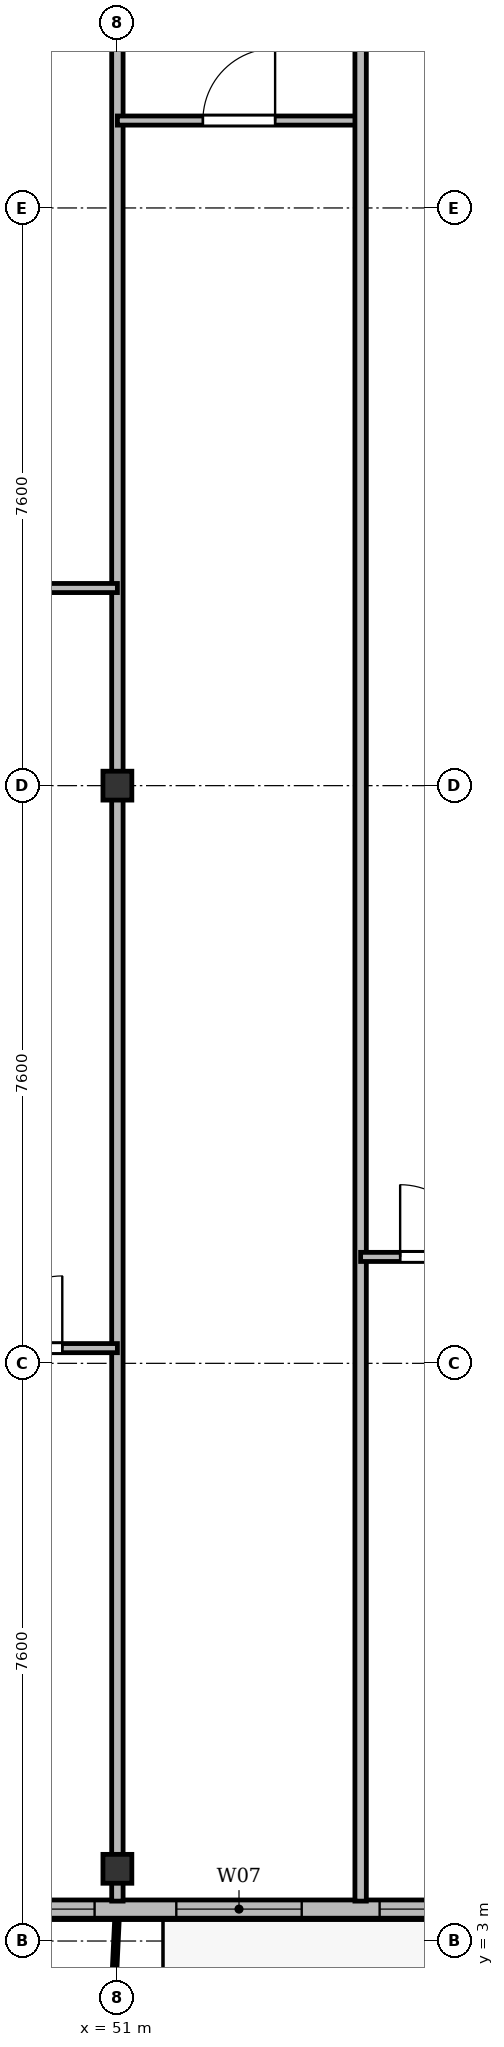
"""IFC4 building model, lengths in metres.
Left out: names, types, materials, properties, quantities, classifications, styles, units other than length and angle.
Written with IfcOpenShell. Run it as: python <this file> out.ifc"""

import sys

from ifc_helpers import new_model, si_unit, direction, frame, frame_2d, origin, origin_2d, place, context, subcontext, project, spatial, rectangle, i_section, extrude, source, transform, mapped, element, fill, save


model = new_model("IFC4")
c1 = context("Model", 3, precision=1e-05, world=origin(), true_north=direction((0.0, 1.0)))
c2 = subcontext(c1, "Body", "Model", "MODEL_VIEW")
j1 = project(units=[si_unit("LENGTHUNIT", "METRE"), si_unit("PLANEANGLEUNIT", "RADIAN")], contexts=[c1])
p1 = place(None, origin())
s1 = spatial("IfcSite", under=j1, at=p1, CompositionType="ELEMENT")
p2 = place(p1, origin())
s2 = spatial("IfcBuilding", under=s1, at=p2, CompositionType="ELEMENT")
p3 = place(p2, frame((0.0, 0.0, 135.7)))
s3 = spatial("IfcBuildingStorey", under=s2, at=p3, CompositionType="ELEMENT", Elevation=135.7)
m1 = source(origin(), c2, "Body", "SweptSolid", [
    extrude(i_section(OverallWidth=0.38, OverallDepth=0.38, WebThickness=0.02, FlangeThickness=0.03, at=origin_2d()), origin(), (0.0, 0.0, 1.0), 3.6),
])
for number, where, z_axis, x_axis in (
    (1, (51.0, 3.95, 0.0), (0.0, 0.0, 1.0), (1.0, 0.0, 0.0)),
    (2, (51.0, 18.2, 0.0), (0.0, 0.0, 1.0), (1.0, 0.0, 0.0)),
):
    element("IfcColumn", number, at=place(p3, frame(where, z_axis=z_axis, x_axis=x_axis)), inside=s3, PredefinedType="COLUMN", context=c2, shape_type="MappedRepresentation", body=[
        mapped(m1, transform((0.0, 0.0, 0.0), x_axis=(1.0, 0.0, 0.0), y_axis=(0.0, 1.0, 0.0), z_axis=(0.0, 0.0, 1.0), scale=1.0)),
    ])
p4 = place(p3, frame((63.6, 3.42, 0.0), z_axis=(0.0, 0.0, 1.0), x_axis=(-1.0, 0.0, 0.0)))
e3 = element("IfcWall", 3, at=p4, inside=s3, PredefinedType="SOLIDWALL", context=c2, shape_type="SweptSolid", body=[
    extrude(rectangle(XDim=52.8, YDim=0.24, at=frame_2d((26.4, 0.0))), origin(), (0.0, 0.0, 1.0), 3.35),
])
p5 = place(p4, frame((0.345, 0.0, 0.9)))
e4 = element("IfcOpeningElement", 4, at=p5, cuts=e3, PredefinedType="OPENING", context=c2, shape_type="SweptSolid", body=[
    extrude(rectangle(XDim=1.8, YDim=1.8, at=frame_2d((0.9, 0.9))), frame((0.0, 0.13, 0.0), z_axis=(0.0, -1.0, 0.0), x_axis=(1.0, 0.0, 0.0)), (0.0, 0.0, 1.0), 0.26),
])
p6 = place(p4, frame((2.9, 0.0, 0.9)))
e5 = element("IfcOpeningElement", 5, at=p6, cuts=e3, PredefinedType="OPENING", context=c2, shape_type="SweptSolid", body=[
    extrude(rectangle(XDim=1.5, YDim=1.75, at=frame_2d((0.75, 0.875))), frame((0.0, 0.13, 0.0), z_axis=(0.0, -1.0, 0.0), x_axis=(1.0, 0.0, 0.0)), (0.0, 0.0, 1.0), 0.26),
])
p7 = place(p4, frame((5.902, 0.0, 0.0)))
e6 = element("IfcOpeningElement", 6, at=p7, cuts=e3, PredefinedType="OPENING", context=c2, shape_type="SweptSolid", body=[
    extrude(rectangle(XDim=1.2, YDim=2.2, at=frame_2d((0.6, 1.1))), frame((0.0, 0.13, 0.0), z_axis=(0.0, -1.0, 0.0), x_axis=(1.0, 0.0, 0.0)), (0.0, 0.0, 1.0), 0.26),
])
p8 = place(p4, frame((7.65, 0.0, 0.9)))
e7 = element("IfcOpeningElement", 7, at=p8, cuts=e3, PredefinedType="OPENING", context=c2, shape_type="SweptSolid", body=[
    extrude(rectangle(XDim=1.5, YDim=1.75, at=frame_2d((0.75, 0.875))), frame((0.0, 0.13, 0.0), z_axis=(0.0, -1.0, 0.0), x_axis=(1.0, 0.0, 0.0)), (0.0, 0.0, 1.0), 0.26),
])
p9 = place(p4, frame((10.175, 0.0, 0.9)))
e8 = element("IfcOpeningElement", 8, at=p9, cuts=e3, PredefinedType="OPENING", context=c2, shape_type="SweptSolid", body=[
    extrude(rectangle(XDim=1.65, YDim=1.85, at=frame_2d((0.825, 0.925))), frame((0.0, 0.13, 0.0), z_axis=(0.0, -1.0, 0.0), x_axis=(1.0, 0.0, 0.0)), (0.0, 0.0, 1.0), 0.26),
])
p10 = place(p4, frame((12.9, 0.0, 0.9)))
e9 = element("IfcOpeningElement", 9, at=p10, cuts=e3, PredefinedType="OPENING", context=c2, shape_type="SweptSolid", body=[
    extrude(rectangle(XDim=1.8, YDim=1.8, at=frame_2d((0.9, 0.9))), frame((0.0, 0.13, 0.0), z_axis=(0.0, -1.0, 0.0), x_axis=(1.0, 0.0, 0.0)), (0.0, 0.0, 1.0), 0.26),
])
p11 = place(p4, frame((15.45, 0.0, 0.9)))
e10 = element("IfcOpeningElement", 10, at=p11, cuts=e3, PredefinedType="OPENING", context=c2, shape_type="SweptSolid", body=[
    extrude(rectangle(XDim=1.5, YDim=1.75, at=frame_2d((0.75, 0.875))), frame((0.0, 0.13, 0.0), z_axis=(0.0, -1.0, 0.0), x_axis=(1.0, 0.0, 0.0)), (0.0, 0.0, 1.0), 0.26),
])
p12 = place(p4, frame((17.85, 0.0, 0.9)))
e11 = element("IfcOpeningElement", 11, at=p12, cuts=e3, PredefinedType="OPENING", context=c2, shape_type="SweptSolid", body=[
    extrude(rectangle(XDim=1.5, YDim=1.75, at=frame_2d((0.75, 0.875))), frame((0.0, 0.13, 0.0), z_axis=(0.0, -1.0, 0.0), x_axis=(1.0, 0.0, 0.0)), (0.0, 0.0, 1.0), 0.26),
])
p13 = place(p4, frame((20.45, 0.0, 0.9)))
e12 = element("IfcOpeningElement", 12, at=p13, cuts=e3, PredefinedType="OPENING", context=c2, shape_type="SweptSolid", body=[
    extrude(rectangle(XDim=2.0, YDim=1.95, at=frame_2d((1.0, 0.975))), frame((0.0, 0.13, 0.0), z_axis=(0.0, -1.0, 0.0), x_axis=(1.0, 0.0, 0.0)), (0.0, 0.0, 1.0), 0.26),
])
p14 = place(p4, frame((23.925, 0.0, 0.9)))
e13 = element("IfcOpeningElement", 13, at=p14, cuts=e3, PredefinedType="OPENING", context=c2, shape_type="SweptSolid", body=[
    extrude(rectangle(XDim=1.65, YDim=1.85, at=frame_2d((0.825, 0.925))), frame((0.0, 0.13, 0.0), z_axis=(0.0, -1.0, 0.0), x_axis=(1.0, 0.0, 0.0)), (0.0, 0.0, 1.0), 0.26),
])
p15 = place(p4, frame((28.8, 0.0, 0.9)))
e14 = element("IfcOpeningElement", 14, at=p15, cuts=e3, PredefinedType="OPENING", context=c2, shape_type="SweptSolid", body=[
    extrude(rectangle(XDim=1.8, YDim=1.8, at=frame_2d((0.9, 0.9))), frame((0.0, 0.13, 0.0), z_axis=(0.0, -1.0, 0.0), x_axis=(1.0, 0.0, 0.0)), (0.0, 0.0, 1.0), 0.26),
])
p16 = place(p4, frame((34.478, 0.0, 0.0)))
e15 = element("IfcOpeningElement", 15, at=p16, cuts=e3, PredefinedType="OPENING", context=c2, shape_type="SweptSolid", body=[
    extrude(rectangle(XDim=1.2, YDim=2.2, at=frame_2d((0.6, 1.1))), frame((0.0, 0.13, 0.0), z_axis=(0.0, -1.0, 0.0), x_axis=(1.0, 0.0, 0.0)), (0.0, 0.0, 1.0), 0.26),
])
p17 = place(p4, frame((37.65, 0.0, 0.9)))
e16 = element("IfcOpeningElement", 16, at=p17, cuts=e3, PredefinedType="OPENING", context=c2, shape_type="SweptSolid", body=[
    extrude(rectangle(XDim=1.5, YDim=1.75, at=frame_2d((0.75, 0.875))), frame((0.0, 0.13, 0.0), z_axis=(0.0, -1.0, 0.0), x_axis=(1.0, 0.0, 0.0)), (0.0, 0.0, 1.0), 0.26),
])
p18 = place(p4, frame((40.8, 0.0, 0.9)))
e17 = element("IfcOpeningElement", 17, at=p18, cuts=e3, PredefinedType="OPENING", context=c2, shape_type="SweptSolid", body=[
    extrude(rectangle(XDim=2.0, YDim=1.95, at=frame_2d((1.0, 0.975))), frame((0.0, 0.13, 0.0), z_axis=(0.0, -1.0, 0.0), x_axis=(1.0, 0.0, 0.0)), (0.0, 0.0, 1.0), 0.26),
])
p19 = place(p4, frame((43.65, 0.0, 0.9)))
e18 = element("IfcOpeningElement", 18, at=p19, cuts=e3, PredefinedType="OPENING", context=c2, shape_type="SweptSolid", body=[
    extrude(rectangle(XDim=1.5, YDim=1.75, at=frame_2d((0.75, 0.875))), frame((0.0, 0.13, 0.0), z_axis=(0.0, -1.0, 0.0), x_axis=(1.0, 0.0, 0.0)), (0.0, 0.0, 1.0), 0.26),
])
p20 = place(p4, frame((45.7, 0.0, 0.9)))
e19 = element("IfcOpeningElement", 19, at=p20, cuts=e3, PredefinedType="OPENING", context=c2, shape_type="SweptSolid", body=[
    extrude(rectangle(XDim=1.8, YDim=1.8, at=frame_2d((0.9, 0.9))), frame((0.0, 0.13, 0.0), z_axis=(0.0, -1.0, 0.0), x_axis=(1.0, 0.0, 0.0)), (0.0, 0.0, 1.0), 0.26),
])
p21 = place(p4, frame((48.25, 0.0, 0.9)))
e20 = element("IfcOpeningElement", 20, at=p21, cuts=e3, PredefinedType="OPENING", context=c2, shape_type="SweptSolid", body=[
    extrude(rectangle(XDim=1.5, YDim=1.75, at=frame_2d((0.75, 0.875))), frame((0.0, 0.13, 0.0), z_axis=(0.0, -1.0, 0.0), x_axis=(1.0, 0.0, 0.0)), (0.0, 0.0, 1.0), 0.26),
])
p22 = place(p4, frame((50.705, 0.0, 0.9)))
e21 = element("IfcOpeningElement", 21, at=p22, cuts=e3, PredefinedType="OPENING", context=c2, shape_type="SweptSolid", body=[
    extrude(rectangle(XDim=1.5, YDim=1.75, at=frame_2d((0.75, 0.875))), frame((0.0, 0.13, 0.0), z_axis=(0.0, -1.0, 0.0), x_axis=(1.0, 0.0, 0.0)), (0.0, 0.0, 1.0), 0.26),
])
p23 = place(p3, frame((51.0, 3.525, 0.0), z_axis=(0.0, 0.0, 1.0), x_axis=(0.0, 1.0, 0.0)))
e22 = element("IfcWall", 22, at=p23, inside=s3, PredefinedType="PARTITIONING", context=c2, shape_type="SweptSolid", body=[
    extrude(rectangle(XDim=27.275, YDim=0.15, at=frame_2d((13.638, 0.0))), origin(), (0.0, 0.0, 1.0), 2.85),
])
p24 = place(p3, frame((43.8, 20.8, 0.0), z_axis=(0.0, 0.0, 1.0), x_axis=(1.0, 0.0, 0.0)))
e23 = element("IfcWall", 23, at=p24, inside=s3, PredefinedType="PARTITIONING", context=c2, shape_type="SweptSolid", body=[
    extrude(rectangle(XDim=7.2, YDim=0.12, at=frame_2d((3.6, 0.0))), origin(), (0.0, 0.0, 1.0), 2.85),
])
p25 = place(p24, frame((3.125, 0.0, 0.0)))
e24 = element("IfcOpeningElement", 24, at=p25, cuts=e23, PredefinedType="OPENING", context=c2, shape_type="SweptSolid", body=[
    extrude(rectangle(XDim=0.95, YDim=2.15, at=frame_2d((0.475, 1.075))), frame((0.0, 0.07, 0.0), z_axis=(0.0, -1.0, 0.0), x_axis=(1.0, 0.0, 0.0)), (0.0, 0.0, 1.0), 0.14),
])
p26 = place(p3, frame((48.6, 10.8, 0.0), z_axis=(0.0, 0.0, 1.0), x_axis=(1.0, 0.0, 0.0)))
e25 = element("IfcWall", 25, at=p26, inside=s3, PredefinedType="PARTITIONING", context=c2, shape_type="SweptSolid", body=[
    extrude(rectangle(XDim=2.4, YDim=0.12, at=frame_2d((1.2, 0.0))), origin(), (0.0, 0.0, 1.0), 2.85),
])
p27 = place(p26, frame((0.725, 0.0, 0.0)))
e26 = element("IfcOpeningElement", 26, at=p27, cuts=e25, PredefinedType="OPENING", context=c2, shape_type="SweptSolid", body=[
    extrude(rectangle(XDim=0.95, YDim=2.15, at=frame_2d((0.475, 1.075))), frame((0.0, 0.07, 0.0), z_axis=(0.0, -1.0, 0.0), x_axis=(1.0, 0.0, 0.0)), (0.0, 0.0, 1.0), 0.14),
])
p28 = place(p3, frame((51.0, 26.95, 0.0), z_axis=(0.0, 0.0, 1.0), x_axis=(1.0, 0.0, 0.0)))
e27 = element("IfcWall", 27, at=p28, inside=s3, PredefinedType="PARTITIONING", context=c2, shape_type="SweptSolid", body=[
    extrude(rectangle(XDim=3.2, YDim=0.12, at=frame_2d((1.6, 0.0))), origin(), (0.0, 0.0, 1.0), 2.85),
])
p29 = place(p28, frame((1.125, 0.0, 0.0)))
e28 = element("IfcOpeningElement", 28, at=p29, cuts=e27, PredefinedType="OPENING", context=c2, shape_type="SweptSolid", body=[
    extrude(rectangle(XDim=0.95, YDim=2.15, at=frame_2d((0.475, 1.075))), frame((0.0, 0.07, 0.0), z_axis=(0.0, -1.0, 0.0), x_axis=(1.0, 0.0, 0.0)), (0.0, 0.0, 1.0), 0.14),
])
p30 = place(p3, frame((54.2, 3.525, 0.0), z_axis=(0.0, 0.0, 1.0), x_axis=(0.0, 1.0, 0.0)))
e29 = element("IfcWall", 29, at=p30, inside=s3, PredefinedType="PARTITIONING", context=c2, shape_type="SweptSolid", body=[
    extrude(rectangle(XDim=27.275, YDim=0.15, at=frame_2d((13.638, 0.0))), origin(), (0.0, 0.0, 1.0), 2.75),
])
p31 = place(p3, frame((54.2, 12.0, 0.0), z_axis=(0.0, 0.0, 1.0), x_axis=(1.0, 0.0, 0.0)))
e30 = element("IfcWall", 30, at=p31, inside=s3, PredefinedType="PARTITIONING", context=c2, shape_type="SweptSolid", body=[
    extrude(rectangle(XDim=2.0, YDim=0.12, at=frame_2d((1.0, 0.0))), origin(), (0.0, 0.0, 1.0), 3.35),
])
p32 = place(p31, frame((0.52, 0.0, 0.0)))
e31 = element("IfcOpeningElement", 31, at=p32, cuts=e30, PredefinedType="OPENING", context=c2, shape_type="SweptSolid", body=[
    extrude(rectangle(XDim=0.95, YDim=2.15, at=frame_2d((0.475, 1.075))), frame((0.0, 0.07, 0.0), z_axis=(0.0, -1.0, 0.0), x_axis=(1.0, 0.0, 0.0)), (0.0, 0.0, 1.0), 0.14),
])
m2 = source(origin(), c2, "Body", "SweptSolid", [
    extrude(rectangle(XDim=1.5, YDim=1.75, at=frame_2d((0.75, 0.875))), frame((0.0, 0.03, 0.0), z_axis=(0.0, -1.0, 0.0), x_axis=(1.0, 0.0, 0.0)), (0.0, 0.0, 1.0), 0.06),
])
p33 = place(p8, origin())
e32 = element("IfcWindow", 32, at=p33, inside=s3, PartitioningType="SINGLE_PANEL", PredefinedType="WINDOW", context=c2, shape_type="MappedRepresentation", body=[
    mapped(m2, transform((0.0, 0.0, 0.0), x_axis=(1.0, 0.0, 0.0), y_axis=(0.0, 1.0, 0.0), z_axis=(0.0, 0.0, 1.0), scale=1.0)),
])
fill(e7, e32)
m3 = source(origin(), c2, "Body", "SweptSolid", [
    extrude(rectangle(XDim=1.65, YDim=1.85, at=frame_2d((0.825, 0.925))), frame((0.0, 0.03, 0.0), z_axis=(0.0, -1.0, 0.0), x_axis=(1.0, 0.0, 0.0)), (0.0, 0.0, 1.0), 0.06),
])
p34 = place(p9, origin())
e33 = element("IfcWindow", 33, at=p34, inside=s3, PartitioningType="SINGLE_PANEL", PredefinedType="WINDOW", context=c2, shape_type="MappedRepresentation", body=[
    mapped(m3, transform((0.0, 0.0, 0.0), x_axis=(1.0, 0.0, 0.0), y_axis=(0.0, 1.0, 0.0), z_axis=(0.0, 0.0, 1.0), scale=1.0)),
])
fill(e8, e33)
m4 = source(origin(), c2, "Body", "SweptSolid", [
    extrude(rectangle(XDim=1.8, YDim=1.8, at=frame_2d((0.9, 0.9))), frame((0.0, 0.03, 0.0), z_axis=(0.0, -1.0, 0.0), x_axis=(1.0, 0.0, 0.0)), (0.0, 0.0, 1.0), 0.06),
])
p35 = place(p10, origin())
e34 = element("IfcWindow", 34, at=p35, inside=s3, PartitioningType="SINGLE_PANEL", PredefinedType="WINDOW", context=c2, shape_type="MappedRepresentation", body=[
    mapped(m4, transform((0.0, 0.0, 0.0), x_axis=(1.0, 0.0, 0.0), y_axis=(0.0, 1.0, 0.0), z_axis=(0.0, 0.0, 1.0), scale=1.0)),
])
fill(e9, e34)
m5 = source(origin(), c2, "Body", "SweptSolid", [
    extrude(rectangle(XDim=0.95, YDim=2.15, at=frame_2d((0.475, 1.075))), frame((0.0, 0.025, 0.0), z_axis=(0.0, -1.0, 0.0), x_axis=(1.0, 0.0, 0.0)), (0.0, 0.0, 1.0), 0.05),
])
p36 = place(p27, origin())
e35 = element("IfcDoor", 35, at=p36, inside=s3, OperationType="SINGLE_SWING_RIGHT", PredefinedType="DOOR", context=c2, shape_type="MappedRepresentation", body=[
    mapped(m5, transform((0.0, 0.0, 0.0), x_axis=(1.0, 0.0, 0.0), y_axis=(0.0, 1.0, 0.0), z_axis=(0.0, 0.0, 1.0), scale=1.0)),
])
fill(e26, e35)
p37 = place(p29, origin())
e36 = element("IfcDoor", 36, at=p37, inside=s3, OperationType="SINGLE_SWING_RIGHT", PredefinedType="DOOR", context=c2, shape_type="MappedRepresentation", body=[
    mapped(m5, transform((0.0, 0.0, 0.0), x_axis=(1.0, 0.0, 0.0), y_axis=(0.0, 1.0, 0.0), z_axis=(0.0, 0.0, 1.0), scale=1.0)),
])
fill(e28, e36)
p38 = place(p32, origin())
e37 = element("IfcDoor", 37, at=p38, inside=s3, OperationType="SINGLE_SWING_LEFT", PredefinedType="DOOR", context=c2, shape_type="MappedRepresentation", body=[
    mapped(m5, transform((0.0, 0.0, 0.0), x_axis=(1.0, 0.0, 0.0), y_axis=(0.0, 1.0, 0.0), z_axis=(0.0, 0.0, 1.0), scale=1.0)),
])
fill(e31, e37)
save(model, sys.argv[1])
